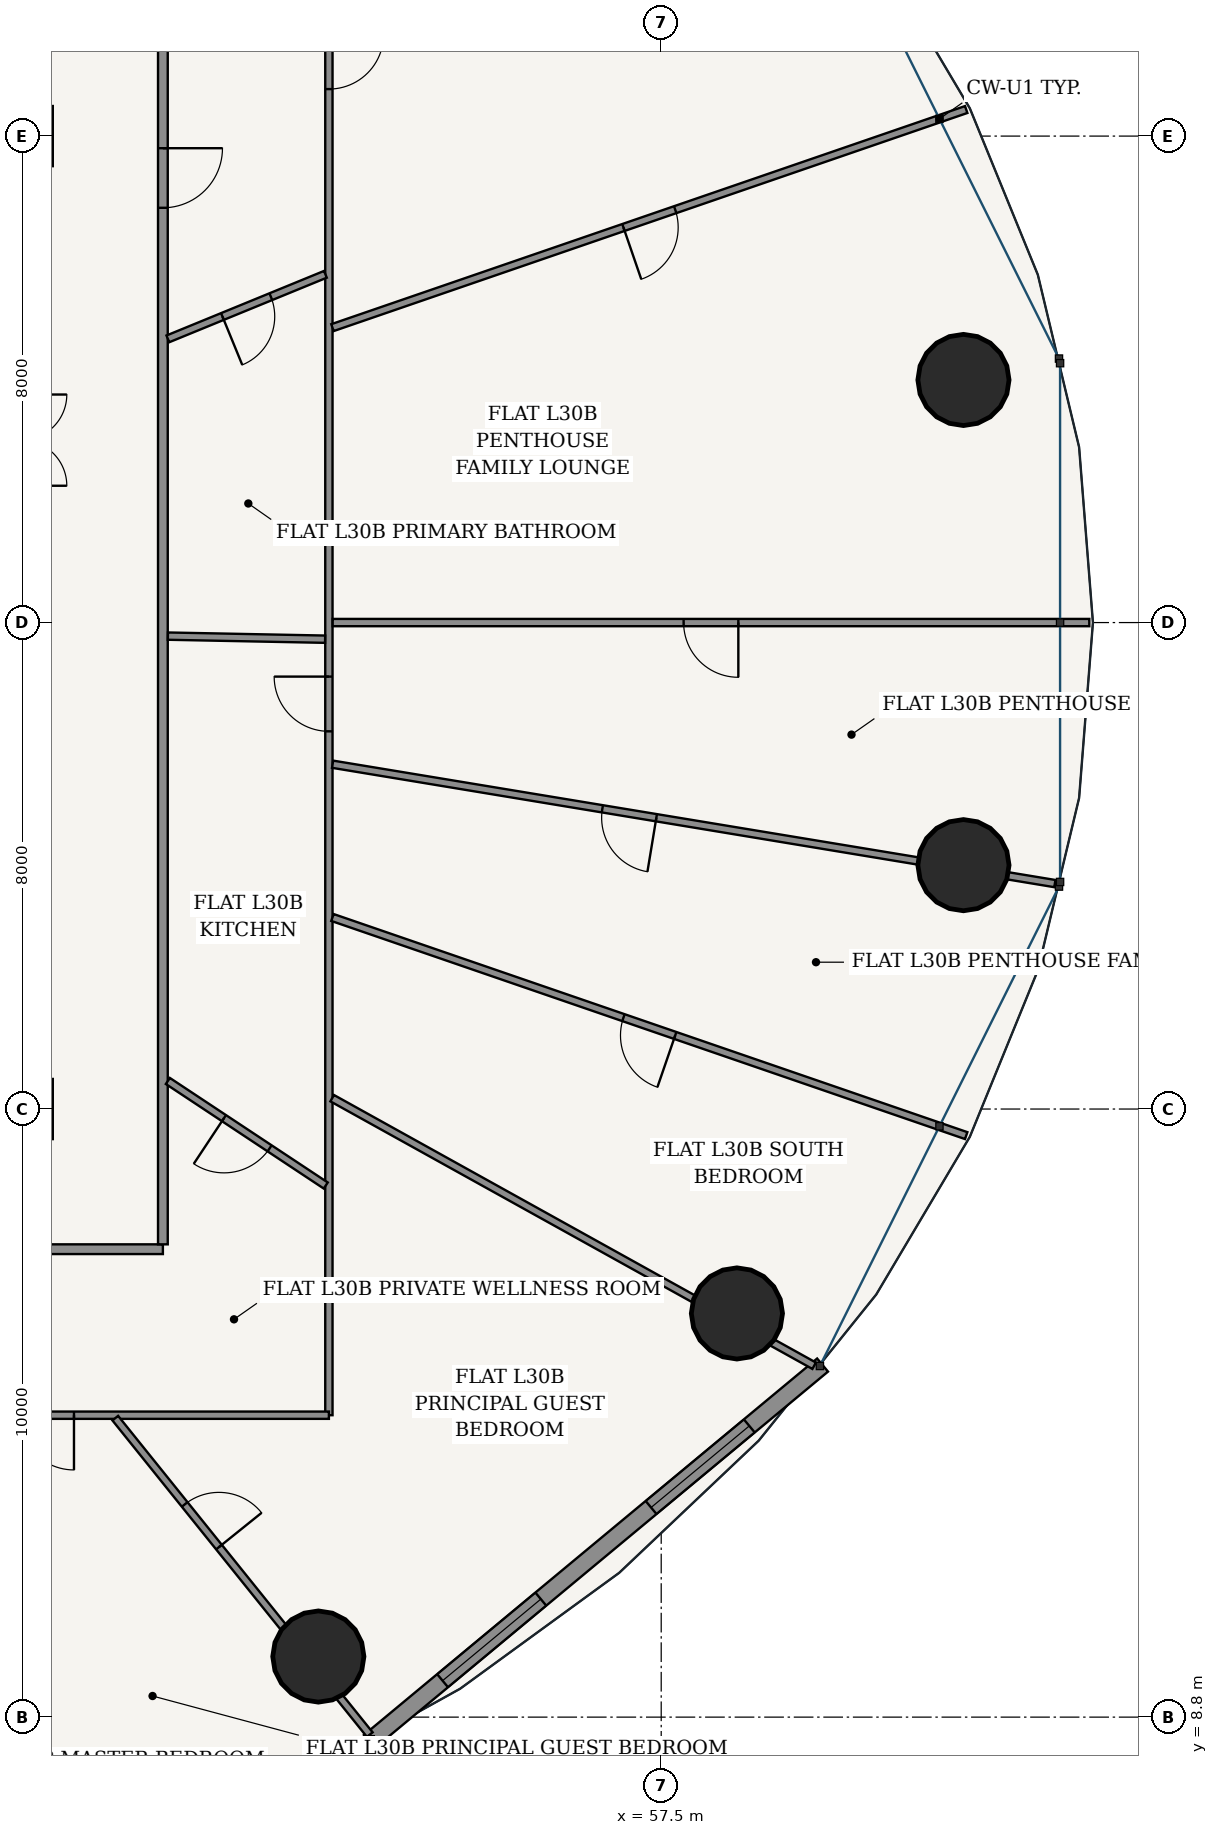
"""IFC4 building model, lengths in metres.
Left out: names, types, materials, properties, quantities, classifications, styles, units other than length and angle.
Written with IfcOpenShell. Run it as: python <this file> out.ifc"""

import sys

from ifc_helpers import new_model, si_unit, direction, frame, frame_2d, origin, origin_2d, place, context, subcontext, project, spatial, rectangle, hollow_circle, extrude, source, transform, mapped, element, fill, save


model = new_model("IFC4")
c1 = context("Model", 3, precision=1e-05, world=origin(), true_north=direction((-0.2419218956, 0.970295726276)))
c2 = subcontext(c1, "Body", "Model", "MODEL_VIEW")
j1 = project(units=[si_unit("LENGTHUNIT", "METRE"), si_unit("PLANEANGLEUNIT", "RADIAN")], contexts=[c1])
p1 = place(None, origin())
s1 = spatial("IfcSite", under=j1, at=p1, CompositionType="ELEMENT")
p2 = place(p1, origin())
s2 = spatial("IfcBuilding", under=s1, at=p2, CompositionType="ELEMENT")
p3 = place(p2, frame((0.0, 0.0, 115.8)))
s3 = spatial("IfcBuildingStorey", under=s2, at=p3, CompositionType="ELEMENT", Elevation=115.8)
for number, where, z_axis, x_axis in (
    (1, (62.471, 30.79, 0.0), (0.0, 0.0, 1.0), (1.0, 0.0, 0.0)),
    (2, (51.862, 9.796, 0.0), (0.0, 0.0, 1.0), (1.0, 0.0, 0.0)),
    (3, (58.745, 15.438, 0.0), (0.0, 0.0, 1.0), (1.0, 0.0, 0.0)),
    (4, (62.471, 22.81, 0.0), (0.0, 0.0, 1.0), (1.0, 0.0, 0.0)),
):
    element("IfcColumn", number, at=place(p3, frame(where, z_axis=z_axis, x_axis=x_axis)), inside=s3, PredefinedType="COLUMN", context=c2, shape_type="SweptSolid", body=[
        extrude(hollow_circle(Radius=0.75, WallThickness=0.045, at=origin_2d()), origin(), (0.0, 0.0, 1.0), 3.6),
    ])
p4 = place(p3, frame((52.7, 8.398, 0.0), z_axis=(0.0, 0.0, 1.0), x_axis=(0.769254958887, 0.638941944333, 0.0)))
e5 = element("IfcWall", 5, at=p4, inside=s3, PredefinedType="SOLIDWALL", context=c2, shape_type="SweptSolid", body=[
    extrude(rectangle(XDim=9.69, YDim=0.28, at=frame_2d((4.845, 0.0))), origin(), (0.0, 0.0, 1.0), 3.325),
])
p5 = place(p4, frame((1.566, 0.0, 0.85)))
e6 = element("IfcOpeningElement", 6, at=p5, cuts=e5, PredefinedType="OPENING", context=c2, shape_type="SweptSolid", body=[
    extrude(rectangle(XDim=2.1, YDim=1.95, at=frame_2d((1.05, 0.975))), frame((0.0, 0.15, 0.0), z_axis=(0.0, -1.0, 0.0), x_axis=(1.0, 0.0, 0.0)), (0.0, 0.0, 1.0), 0.3),
])
p6 = place(p4, frame((6.023, 0.0, 0.85)))
e7 = element("IfcOpeningElement", 7, at=p6, cuts=e5, PredefinedType="OPENING", context=c2, shape_type="SweptSolid", body=[
    extrude(rectangle(XDim=2.1, YDim=1.95, at=frame_2d((1.05, 0.975))), frame((0.0, 0.15, 0.0), z_axis=(0.0, -1.0, 0.0), x_axis=(1.0, 0.0, 0.0)), (0.0, 0.0, 1.0), 0.3),
])
p7 = place(p3, frame((26.695, 16.495, 0.0), z_axis=(0.0, 0.0, 1.0), x_axis=(1.0, 0.0, 0.0)))
e8 = element("IfcWall", 8, at=p7, inside=s3, PredefinedType="PARTITIONING", context=c2, shape_type="SweptSolid", body=[
    extrude(rectangle(XDim=22.61, YDim=0.16, at=frame_2d((11.305, 0.0))), origin(), (0.0, 0.0, 1.0), 2.767),
])
p8 = place(p3, frame((49.305, 16.575, 0.0), z_axis=(0.0, 0.0, 1.0), x_axis=(0.0, 1.0, 0.0)))
e9 = element("IfcWall", 9, at=p8, inside=s3, PredefinedType="PARTITIONING", context=c2, shape_type="SweptSolid", body=[
    extrude(rectangle(XDim=20.45, YDim=0.16, at=frame_2d((10.225, 0.0))), origin(), (0.0, 0.0, 1.0), 2.767),
])
p9 = place(p8, frame((17.046, 0.0, 0.0)))
e10 = element("IfcOpeningElement", 10, at=p9, cuts=e9, PredefinedType="OPENING", context=c2, shape_type="SweptSolid", body=[
    extrude(rectangle(XDim=0.98, YDim=2.2, at=frame_2d((0.49, 1.1))), frame((0.0, 0.09, 0.0), z_axis=(0.0, -1.0, 0.0), x_axis=(1.0, 0.0, 0.0)), (0.0, 0.0, 1.0), 0.18),
])
p10 = place(p3, frame((52.035, 39.835, 0.0), z_axis=(0.0, 0.0, 1.0), x_axis=(0.0, -1.0, 0.0)))
e11 = element("IfcWall", 11, at=p10, inside=s3, PredefinedType="PARTITIONING", context=c2, shape_type="SweptSolid", body=[
    extrude(rectangle(XDim=26.07, YDim=0.12, at=frame_2d((13.035, 0.0))), origin(), (0.0, 0.0, 1.0), 2.767),
])
p11 = place(p10, frame((3.362, 0.0, 0.0)))
e12 = element("IfcOpeningElement", 12, at=p11, cuts=e11, PredefinedType="OPENING", context=c2, shape_type="SweptSolid", body=[
    extrude(rectangle(XDim=0.9, YDim=2.15, at=frame_2d((0.45, 1.075))), frame((0.0, 0.07, 0.0), z_axis=(0.0, -1.0, 0.0), x_axis=(1.0, 0.0, 0.0)), (0.0, 0.0, 1.0), 0.14),
])
p12 = place(p10, frame((13.924, 0.0, 0.0)))
e13 = element("IfcOpeningElement", 13, at=p12, cuts=e11, PredefinedType="OPENING", context=c2, shape_type="SweptSolid", body=[
    extrude(rectangle(XDim=0.9, YDim=2.15, at=frame_2d((0.45, 1.075))), frame((0.0, 0.07, 0.0), z_axis=(0.0, -1.0, 0.0), x_axis=(1.0, 0.0, 0.0)), (0.0, 0.0, 1.0), 0.14),
])
p13 = place(p3, frame((52.035, 13.765, 0.0), z_axis=(0.0, 0.0, 1.0), x_axis=(-1.0, 0.0, 0.0)))
e14 = element("IfcWall", 14, at=p13, inside=s3, PredefinedType="PARTITIONING", context=c2, shape_type="SweptSolid", body=[
    extrude(rectangle(XDim=24.416, YDim=0.12, at=frame_2d((12.208, 0.0))), origin(), (0.0, 0.0, 1.0), 2.767),
])
p14 = place(p13, frame((4.192, 0.0, 0.0)))
e15 = element("IfcOpeningElement", 15, at=p14, cuts=e14, PredefinedType="OPENING", context=c2, shape_type="SweptSolid", body=[
    extrude(rectangle(XDim=0.9, YDim=2.15, at=frame_2d((0.45, 1.075))), frame((0.0, 0.07, 0.0), z_axis=(0.0, -1.0, 0.0), x_axis=(1.0, 0.0, 0.0)), (0.0, 0.0, 1.0), 0.14),
])
p15 = place(p13, frame((19.728, 0.0, 0.0)))
e16 = element("IfcOpeningElement", 16, at=p15, cuts=e14, PredefinedType="OPENING", context=c2, shape_type="SweptSolid", body=[
    extrude(rectangle(XDim=0.86, YDim=2.15, at=frame_2d((0.43, 1.075))), frame((0.0, 0.07, 0.0), z_axis=(0.0, -1.0, 0.0), x_axis=(1.0, 0.0, 0.0)), (0.0, 0.0, 1.0), 0.14),
])
p16 = place(p3, frame((44.526, 13.709, 0.0), z_axis=(0.0, 0.0, 1.0), x_axis=(0.446179583353, -0.894943450392, 0.0)))
e17 = element("IfcWall", 17, at=p16, inside=s3, PredefinedType="PARTITIONING", context=c2, shape_type="SweptSolid", body=[
    extrude(rectangle(XDim=8.125, YDim=0.12, at=frame_2d((4.062, 0.0))), origin(), (0.0, 0.0, 1.0), 2.767),
])
p17 = place(p16, frame((3.612, 0.0, 0.0)))
e18 = element("IfcOpeningElement", 18, at=p17, cuts=e17, PredefinedType="OPENING", context=c2, shape_type="SweptSolid", body=[
    extrude(rectangle(XDim=0.9, YDim=2.15, at=frame_2d((0.45, 1.075))), frame((0.0, 0.07, 0.0), z_axis=(0.0, -1.0, 0.0), x_axis=(1.0, 0.0, 0.0)), (0.0, 0.0, 1.0), 0.14),
])
p18 = place(p3, frame((48.522, 13.717, 0.0), z_axis=(0.0, 0.0, 1.0), x_axis=(0.626707979732, -0.77925419995, 0.0)))
e19 = element("IfcWall", 19, at=p18, inside=s3, PredefinedType="PARTITIONING", context=c2, shape_type="SweptSolid", body=[
    extrude(rectangle(XDim=6.679, YDim=0.12, at=frame_2d((3.339, 0.0))), origin(), (0.0, 0.0, 1.0), 2.767),
])
p19 = place(p18, frame((1.821, 0.0, 0.0)))
e20 = element("IfcOpeningElement", 20, at=p19, cuts=e19, PredefinedType="OPENING", context=c2, shape_type="SweptSolid", body=[
    extrude(rectangle(XDim=0.9, YDim=2.15, at=frame_2d((0.45, 1.075))), frame((0.0, 0.07, 0.0), z_axis=(0.0, -1.0, 0.0), x_axis=(1.0, 0.0, 0.0)), (0.0, 0.0, 1.0), 0.14),
])
p20 = place(p3, frame((52.089, 18.979, 0.0), z_axis=(0.0, 0.0, 1.0), x_axis=(0.874313476423, -0.485361664066, 0.0)))
e21 = element("IfcWall", 21, at=p20, inside=s3, PredefinedType="PARTITIONING", context=c2, shape_type="SweptSolid", body=[
    extrude(rectangle(XDim=9.066, YDim=0.12, at=frame_2d((4.533, 0.0))), origin(), (0.0, 0.0, 1.0), 2.767),
])
p21 = place(p3, frame((52.094, 21.95, 0.0), z_axis=(0.0, 0.0, 1.0), x_axis=(0.945573120726, -0.32540970078, 0.0)))
e22 = element("IfcWall", 22, at=p21, inside=s3, PredefinedType="PARTITIONING", context=c2, shape_type="SweptSolid", body=[
    extrude(rectangle(XDim=11.022, YDim=0.12, at=frame_2d((5.511, 0.0))), origin(), (0.0, 0.0, 1.0), 2.767),
])
p22 = place(p21, frame((5.061, 0.0, 0.0)))
e23 = element("IfcOpeningElement", 23, at=p22, cuts=e22, PredefinedType="OPENING", context=c2, shape_type="SweptSolid", body=[
    extrude(rectangle(XDim=0.9, YDim=2.15, at=frame_2d((0.45, 1.075))), frame((0.0, 0.07, 0.0), z_axis=(0.0, -1.0, 0.0), x_axis=(1.0, 0.0, 0.0)), (0.0, 0.0, 1.0), 0.14),
])
p23 = place(p3, frame((52.096, 24.47, 0.0), z_axis=(0.0, 0.0, 1.0), x_axis=(0.986618264768, -0.163047231274, 0.0)))
e24 = element("IfcWall", 24, at=p23, inside=s3, PredefinedType="PARTITIONING", context=c2, shape_type="SweptSolid", body=[
    extrude(rectangle(XDim=12.039, YDim=0.12, at=frame_2d((6.02, 0.0))), origin(), (0.0, 0.0, 1.0), 2.767),
])
p24 = place(p23, frame((4.496, 0.0, 0.0)))
e25 = element("IfcOpeningElement", 25, at=p24, cuts=e24, PredefinedType="OPENING", context=c2, shape_type="SweptSolid", body=[
    extrude(rectangle(XDim=0.9, YDim=2.15, at=frame_2d((0.45, 1.075))), frame((0.0, 0.07, 0.0), z_axis=(0.0, -1.0, 0.0), x_axis=(1.0, 0.0, 0.0)), (0.0, 0.0, 1.0), 0.14),
])
p25 = place(p3, frame((52.097, 26.8, 0.0), z_axis=(0.0, 0.0, 1.0), x_axis=(1.0, 0.0, 0.0)))
e26 = element("IfcWall", 26, at=p25, inside=s3, PredefinedType="PARTITIONING", context=c2, shape_type="SweptSolid", body=[
    extrude(rectangle(XDim=12.443, YDim=0.12, at=frame_2d((6.222, 0.0))), origin(), (0.0, 0.0, 1.0), 2.767),
])
p26 = place(p25, frame((5.771, 0.0, 0.0)))
e27 = element("IfcOpeningElement", 27, at=p26, cuts=e26, PredefinedType="OPENING", context=c2, shape_type="SweptSolid", body=[
    extrude(rectangle(XDim=0.9, YDim=2.15, at=frame_2d((0.45, 1.075))), frame((0.0, 0.07, 0.0), z_axis=(0.0, -1.0, 0.0), x_axis=(1.0, 0.0, 0.0)), (0.0, 0.0, 1.0), 0.14),
])
p27 = place(p3, frame((52.094, 31.65, 0.0), z_axis=(0.0, 0.0, 1.0), x_axis=(0.945573120726, 0.32540970078, 0.0)))
e28 = element("IfcWall", 28, at=p27, inside=s3, PredefinedType="PARTITIONING", context=c2, shape_type="SweptSolid", body=[
    extrude(rectangle(XDim=11.022, YDim=0.12, at=frame_2d((5.511, 0.0))), origin(), (0.0, 0.0, 1.0), 2.767),
])
p28 = place(p27, frame((5.061, 0.0, 0.0)))
e29 = element("IfcOpeningElement", 29, at=p28, cuts=e28, PredefinedType="OPENING", context=c2, shape_type="SweptSolid", body=[
    extrude(rectangle(XDim=0.9, YDim=2.15, at=frame_2d((0.45, 1.075))), frame((0.0, 0.07, 0.0), z_axis=(0.0, -1.0, 0.0), x_axis=(1.0, 0.0, 0.0)), (0.0, 0.0, 1.0), 0.14),
])
p29 = place(p3, frame((49.387, 19.261, 0.0), z_axis=(0.0, 0.0, 1.0), x_axis=(0.833806969544, -0.552056099993, 0.0)))
e30 = element("IfcWall", 30, at=p29, inside=s3, PredefinedType="PARTITIONING", context=c2, shape_type="SweptSolid", body=[
    extrude(rectangle(XDim=3.114, YDim=0.12, at=frame_2d((1.557, 0.0))), origin(), (0.0, 0.0, 1.0), 3.325),
])
p30 = place(p29, frame((1.107, 0.0, 0.0)))
e31 = element("IfcOpeningElement", 31, at=p30, cuts=e30, PredefinedType="OPENING", context=c2, shape_type="SweptSolid", body=[
    extrude(rectangle(XDim=0.9, YDim=2.15, at=frame_2d((0.45, 1.075))), frame((0.0, 0.07, 0.0), z_axis=(0.0, -1.0, 0.0), x_axis=(1.0, 0.0, 0.0)), (0.0, 0.0, 1.0), 0.14),
])
p31 = place(p3, frame((49.387, 26.577, 0.0), z_axis=(0.0, 0.0, 1.0), x_axis=(0.999807240787, -0.019633676934, 0.0)))
e32 = element("IfcWall", 32, at=p31, inside=s3, PredefinedType="PARTITIONING", context=c2, shape_type="SweptSolid", body=[
    extrude(rectangle(XDim=2.586, YDim=0.12, at=frame_2d((1.293, 0.0))), origin(), (0.0, 0.0, 1.0), 3.325),
])
p32 = place(p3, frame((49.387, 31.465, 0.0), z_axis=(0.0, 0.0, 1.0), x_axis=(0.925328713836, 0.37916588896, 0.0)))
e33 = element("IfcWall", 33, at=p32, inside=s3, PredefinedType="PARTITIONING", context=c2, shape_type="SweptSolid", body=[
    extrude(rectangle(XDim=2.8, YDim=0.12, at=frame_2d((1.4, 0.0))), origin(), (0.0, 0.0, 1.0), 3.325),
])
p33 = place(p32, frame((0.97, 0.0, 0.0)))
e34 = element("IfcOpeningElement", 34, at=p33, cuts=e33, PredefinedType="OPENING", context=c2, shape_type="SweptSolid", body=[
    extrude(rectangle(XDim=0.86, YDim=2.15, at=frame_2d((0.43, 1.075))), frame((0.0, 0.07, 0.0), z_axis=(0.0, -1.0, 0.0), x_axis=(1.0, 0.0, 0.0)), (0.0, 0.0, 1.0), 0.14),
])
m1 = source(origin(), c2, "Body", "SweptSolid", [
    extrude(rectangle(XDim=2.1, YDim=1.95, at=frame_2d((1.05, 0.975))), frame((0.0, 0.03, 0.0), z_axis=(0.0, -1.0, 0.0), x_axis=(1.0, 0.0, 0.0)), (0.0, 0.0, 1.0), 0.06),
])
p34 = place(p5, origin())
e35 = element("IfcWindow", 35, at=p34, inside=s3, PartitioningType="SINGLE_PANEL", PredefinedType="WINDOW", context=c2, shape_type="MappedRepresentation", body=[
    mapped(m1, transform((0.0, 0.0, 0.0), scale=1.0)),
])
fill(e6, e35)
p35 = place(p6, origin())
e36 = element("IfcWindow", 36, at=p35, inside=s3, PartitioningType="SINGLE_PANEL", PredefinedType="WINDOW", context=c2, shape_type="MappedRepresentation", body=[
    mapped(m1, transform((0.0, 0.0, 0.0), scale=1.0)),
])
fill(e7, e36)
m2 = source(origin(), c2, "Body", "SweptSolid", [
    extrude(rectangle(XDim=0.98, YDim=2.2, at=frame_2d((0.49, 1.1))), frame((0.0, 0.025, 0.0), z_axis=(0.0, -1.0, 0.0), x_axis=(1.0, 0.0, 0.0)), (0.0, 0.0, 1.0), 0.05),
])
p36 = place(p9, frame((0.98, 0.0, 0.0), z_axis=(0.0, 0.0, 1.0), x_axis=(-1.0, 0.0, 0.0)))
e37 = element("IfcDoor", 37, at=p36, inside=s3, OperationType="SINGLE_SWING_LEFT", PredefinedType="DOOR", context=c2, shape_type="MappedRepresentation", body=[
    mapped(m2, transform((0.0, 0.0, 0.0), scale=1.0)),
])
fill(e10, e37)
m3 = source(origin(), c2, "Body", "SweptSolid", [
    extrude(rectangle(XDim=0.86, YDim=2.15, at=frame_2d((0.43, 1.075))), frame((0.0, 0.025, 0.0), z_axis=(0.0, -1.0, 0.0), x_axis=(1.0, 0.0, 0.0)), (0.0, 0.0, 1.0), 0.05),
])
p37 = place(p33, frame((0.86, 0.0, 0.0), z_axis=(0.0, 0.0, 1.0), x_axis=(-1.0, 0.0, 0.0)))
e38 = element("IfcDoor", 38, at=p37, inside=s3, OperationType="SINGLE_SWING_RIGHT", PredefinedType="DOOR", context=c2, shape_type="MappedRepresentation", body=[
    mapped(m3, transform((0.0, 0.0, 0.0), scale=1.0)),
])
fill(e34, e38)
m4 = source(origin(), c2, "Body", "SweptSolid", [
    extrude(rectangle(XDim=0.9, YDim=2.15, at=frame_2d((0.45, 1.075))), frame((0.0, 0.025, 0.0), z_axis=(0.0, -1.0, 0.0), x_axis=(1.0, 0.0, 0.0)), (0.0, 0.0, 1.0), 0.05),
])
p38 = place(p11, origin())
e39 = element("IfcDoor", 39, at=p38, inside=s3, OperationType="SINGLE_SWING_LEFT", PredefinedType="DOOR", context=c2, shape_type="MappedRepresentation", body=[
    mapped(m4, transform((0.0, 0.0, 0.0), scale=1.0)),
])
fill(e12, e39)
p39 = place(p28, frame((0.9, 0.0, 0.0), z_axis=(0.0, 0.0, 1.0), x_axis=(-1.0, 0.0, 0.0)))
e40 = element("IfcDoor", 40, at=p39, inside=s3, OperationType="SINGLE_SWING_RIGHT", PredefinedType="DOOR", context=c2, shape_type="MappedRepresentation", body=[
    mapped(m4, transform((0.0, 0.0, 0.0), scale=1.0)),
])
fill(e29, e40)
p40 = place(p26, frame((0.9, 0.0, 0.0), z_axis=(0.0, 0.0, 1.0), x_axis=(-1.0, 0.0, 0.0)))
e41 = element("IfcDoor", 41, at=p40, inside=s3, OperationType="SINGLE_SWING_LEFT", PredefinedType="DOOR", context=c2, shape_type="MappedRepresentation", body=[
    mapped(m4, transform((0.0, 0.0, 0.0), scale=1.0)),
])
fill(e27, e41)
p41 = place(p12, frame((0.9, 0.0, 0.0), z_axis=(0.0, 0.0, 1.0), x_axis=(-1.0, 0.0, 0.0)))
e42 = element("IfcDoor", 42, at=p41, inside=s3, OperationType="SINGLE_SWING_RIGHT", PredefinedType="DOOR", context=c2, shape_type="MappedRepresentation", body=[
    mapped(m4, transform((0.0, 0.0, 0.0), scale=1.0)),
])
fill(e13, e42)
p42 = place(p24, frame((0.9, 0.0, 0.0), z_axis=(0.0, 0.0, 1.0), x_axis=(-1.0, 0.0, 0.0)))
e43 = element("IfcDoor", 43, at=p42, inside=s3, OperationType="SINGLE_SWING_LEFT", PredefinedType="DOOR", context=c2, shape_type="MappedRepresentation", body=[
    mapped(m4, transform((0.0, 0.0, 0.0), scale=1.0)),
])
fill(e25, e43)
p43 = place(p30, frame((0.9, 0.0, 0.0), z_axis=(0.0, 0.0, 1.0), x_axis=(-1.0, 0.0, 0.0)))
e44 = element("IfcDoor", 44, at=p43, inside=s3, OperationType="SINGLE_SWING_RIGHT", PredefinedType="DOOR", context=c2, shape_type="MappedRepresentation", body=[
    mapped(m4, transform((0.0, 0.0, 0.0), scale=1.0)),
])
fill(e31, e44)
p44 = place(p14, origin())
e45 = element("IfcDoor", 45, at=p44, inside=s3, OperationType="SINGLE_SWING_LEFT", PredefinedType="DOOR", context=c2, shape_type="MappedRepresentation", body=[
    mapped(m4, transform((0.0, 0.0, 0.0), scale=1.0)),
])
fill(e15, e45)
p45 = place(p19, origin())
e46 = element("IfcDoor", 46, at=p45, inside=s3, OperationType="SINGLE_SWING_RIGHT", PredefinedType="DOOR", context=c2, shape_type="MappedRepresentation", body=[
    mapped(m4, transform((0.0, 0.0, 0.0), scale=1.0)),
])
fill(e20, e46)
p46 = place(p22, frame((0.9, 0.0, 0.0), z_axis=(0.0, 0.0, 1.0), x_axis=(-1.0, 0.0, 0.0)))
e47 = element("IfcDoor", 47, at=p46, inside=s3, OperationType="SINGLE_SWING_LEFT", PredefinedType="DOOR", context=c2, shape_type="MappedRepresentation", body=[
    mapped(m4, transform((0.0, 0.0, 0.0), scale=1.0)),
])
fill(e23, e47)
save(model, sys.argv[1])
